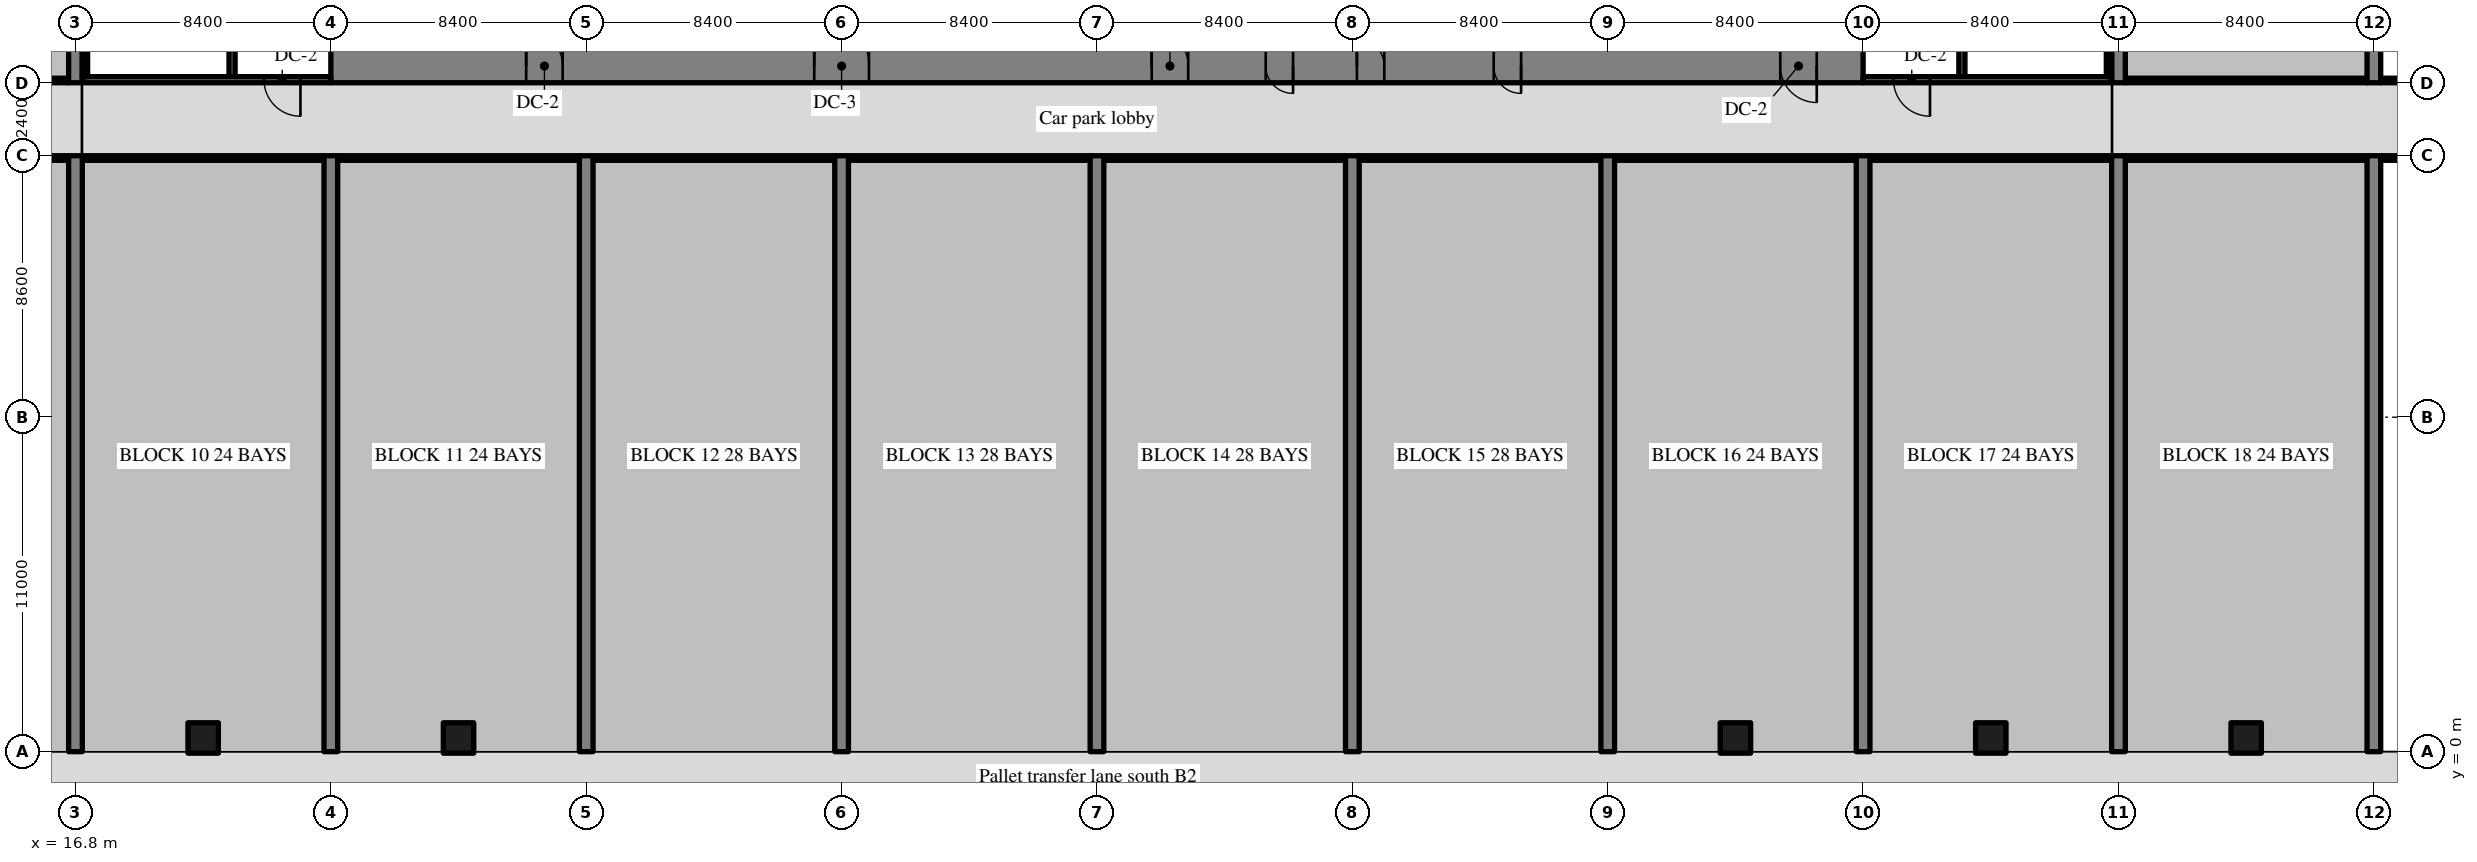
"""IFC4 building model, lengths in metres.
Left out: names, types, materials, properties, quantities, classifications, styles, units other than length and angle.
Written with IfcOpenShell. Run it as: python <this file> out.ifc"""

import sys

from ifc_helpers import new_model, si_unit, direction, frame, frame_2d, origin, origin_2d, place, context, subcontext, project, spatial, rectangle, extrude, source, transform, mapped, element, fill, save


model = new_model("IFC4")
c1 = context("Model", 3, precision=1e-05, world=origin(), true_north=direction((0.0, 1.0)))
c2 = subcontext(c1, "Body", "Model", "MODEL_VIEW")
j1 = project(units=[si_unit("LENGTHUNIT", "METRE"), si_unit("PLANEANGLEUNIT", "RADIAN")], contexts=[c1])
p1 = place(None, origin())
s1 = spatial("IfcSite", under=j1, at=p1, CompositionType="ELEMENT")
p2 = place(p1, origin())
s2 = spatial("IfcBuilding", under=s1, at=p2, CompositionType="ELEMENT")
p3 = place(p2, frame((0.0, 0.0, -9.0)))
s3 = spatial("IfcBuildingStorey", under=s2, at=p3, CompositionType="ELEMENT", Elevation=-9.0)
m1 = source(origin(), c2, "Body", "SweptSolid", [
    extrude(rectangle(XDim=50.4, YDim=1.1, at=frame_2d((25.2, 0.0))), origin(), (0.0, 0.0, 1.0), 4.22),
])
p4 = place(p3, frame((25.2, 22.55, 0.0), z_axis=(0.0, 0.0, 1.0), x_axis=(1.0, 0.0, 0.0)))
e1 = element("IfcWall", 1, at=p4, inside=s3, PredefinedType="SHEAR", context=c2, shape_type="MappedRepresentation", body=[
    mapped(m1, transform((0.0, 0.0, 0.0), scale=1.0)),
])
m2 = source(origin(), c2, "Body", "SweptSolid", [
    extrude(rectangle(XDim=1.8, YDim=2.1, at=frame_2d((0.9, 1.05))), frame((0.0, 0.56, 0.0), z_axis=(0.0, -1.0, 0.0), x_axis=(1.0, 0.0, 0.0)), (0.0, 0.0, 1.0), 1.12),
])
p5 = place(p4, frame((15.9, 0.0, 0.0)))
e2 = element("IfcOpeningElement", 2, at=p5, cuts=e1, PredefinedType="OPENING", context=c2, shape_type="MappedRepresentation", body=[
    mapped(m2, transform((0.0, 0.0, 0.0), scale=1.0)),
])
m3 = source(origin(), c2, "Body", "SweptSolid", [
    extrude(rectangle(XDim=1.2, YDim=2.1, at=frame_2d((0.6, 1.05))), frame((0.0, 0.56, 0.0), z_axis=(0.0, -1.0, 0.0), x_axis=(1.0, 0.0, 0.0)), (0.0, 0.0, 1.0), 1.12),
])
p6 = place(p4, frame((27.0, 0.0, 0.0)))
e3 = element("IfcOpeningElement", 3, at=p6, cuts=e1, PredefinedType="OPENING", context=c2, shape_type="MappedRepresentation", body=[
    mapped(m3, transform((0.0, 0.0, 0.0), scale=1.0)),
])
m4 = source(origin(), c2, "Body", "SweptSolid", [
    extrude(rectangle(XDim=0.9, YDim=2.1, at=frame_2d((0.45, 1.05))), frame((0.0, 0.56, 0.0), z_axis=(0.0, -1.0, 0.0), x_axis=(1.0, 0.0, 0.0)), (0.0, 0.0, 1.0), 1.12),
])
p7 = place(p4, frame((33.75, 0.0, 0.0)))
e4 = element("IfcOpeningElement", 4, at=p7, cuts=e1, PredefinedType="OPENING", context=c2, shape_type="MappedRepresentation", body=[
    mapped(m4, transform((0.0, 0.0, 0.0), scale=1.0)),
])
p8 = place(p4, frame((30.75, 0.0, 0.0)))
e5 = element("IfcOpeningElement", 5, at=p8, cuts=e1, PredefinedType="OPENING", context=c2, shape_type="MappedRepresentation", body=[
    mapped(m4, transform((0.0, 0.0, 0.0), scale=1.0)),
])
p9 = place(p4, frame((38.25, 0.0, 0.0)))
e6 = element("IfcOpeningElement", 6, at=p9, cuts=e1, PredefinedType="OPENING", context=c2, shape_type="MappedRepresentation", body=[
    mapped(m4, transform((0.0, 0.0, 0.0), scale=1.0)),
])
p10 = place(p4, frame((6.425, 0.0, 0.0)))
e7 = element("IfcOpeningElement", 7, at=p10, cuts=e1, PredefinedType="OPENING", context=c2, shape_type="MappedRepresentation", body=[
    mapped(m3, transform((0.0, 0.0, 0.0), scale=1.0)),
])
p11 = place(p4, frame((47.675, 0.0, 0.0)))
e8 = element("IfcOpeningElement", 8, at=p11, cuts=e1, PredefinedType="OPENING", context=c2, shape_type="MappedRepresentation", body=[
    mapped(m3, transform((0.0, 0.0, 0.0), scale=1.0)),
])
m5 = source(origin(), c2, "Body", "SweptSolid", [
    extrude(rectangle(XDim=19.6, YDim=0.45, at=frame_2d((9.8, 0.0))), origin(), (0.0, 0.0, 1.0), 4.22),
])
p12 = place(p3, frame((16.8, 0.0, 0.0), z_axis=(0.0, 0.0, 1.0), x_axis=(0.0, 1.0, 0.0)))
e9 = element("IfcWall", 9, at=p12, inside=s3, PredefinedType="SHEAR", context=c2, shape_type="MappedRepresentation", body=[
    mapped(m5, transform((0.0, 0.0, 0.0), scale=1.0)),
])
m6 = source(origin(), c2, "Body", "SweptSolid", [
    extrude(rectangle(XDim=20.0, YDim=0.45, at=frame_2d((10.0, 0.0))), origin(), (0.0, 0.0, 1.0), 4.22),
])
p13 = place(p3, frame((16.8, 22.0, 0.0), z_axis=(0.0, 0.0, 1.0), x_axis=(0.0, 1.0, 0.0)))
e10 = element("IfcWall", 10, at=p13, inside=s3, PredefinedType="SHEAR", context=c2, shape_type="MappedRepresentation", body=[
    mapped(m6, transform((0.0, 0.0, 0.0), scale=1.0)),
])
for number, where, z_axis, x_axis in (
    (11, (25.2, 0.0, 0.0), (0.0, 0.0, 1.0), (0.0, 1.0, 0.0)),
    (12, (33.6, 0.0, 0.0), (0.0, 0.0, 1.0), (0.0, 1.0, 0.0)),
    (13, (42.0, 0.0, 0.0), (0.0, 0.0, 1.0), (0.0, 1.0, 0.0)),
    (14, (50.4, 0.0, 0.0), (0.0, 0.0, 1.0), (0.0, 1.0, 0.0)),
    (15, (58.8, 0.0, 0.0), (0.0, 0.0, 1.0), (0.0, 1.0, 0.0)),
    (16, (67.2, 0.0, 0.0), (0.0, 0.0, 1.0), (0.0, 1.0, 0.0)),
    (17, (75.6, 0.0, 0.0), (0.0, 0.0, 1.0), (0.0, 1.0, 0.0)),
    (18, (84.0, 0.0, 0.0), (0.0, 0.0, 1.0), (0.0, 1.0, 0.0)),
):
    element("IfcWall", number, at=place(p3, frame(where, z_axis=z_axis, x_axis=x_axis)), inside=s3, PredefinedType="SHEAR", context=c2, shape_type="MappedRepresentation", body=[
        mapped(m5, transform((0.0, 0.0, 0.0), scale=1.0)),
    ])
p14 = place(p3, frame((84.0, 22.0, 0.0), z_axis=(0.0, 0.0, 1.0), x_axis=(0.0, 1.0, 0.0)))
e19 = element("IfcWall", 19, at=p14, inside=s3, PredefinedType="SHEAR", context=c2, shape_type="MappedRepresentation", body=[
    mapped(m6, transform((0.0, 0.0, 0.0), scale=1.0)),
])
p15 = place(p3, frame((92.4, 0.0, 0.0), z_axis=(0.0, 0.0, 1.0), x_axis=(0.0, 1.0, 0.0)))
e20 = element("IfcWall", 20, at=p15, inside=s3, PredefinedType="SHEAR", context=c2, shape_type="MappedRepresentation", body=[
    mapped(m5, transform((0.0, 0.0, 0.0), scale=1.0)),
])
p16 = place(p3, frame((92.4, 22.0, 0.0), z_axis=(0.0, 0.0, 1.0), x_axis=(0.0, 1.0, 0.0)))
e21 = element("IfcWall", 21, at=p16, inside=s3, PredefinedType="SHEAR", context=c2, shape_type="MappedRepresentation", body=[
    mapped(m6, transform((0.0, 0.0, 0.0), scale=1.0)),
])
m7 = source(origin(), c2, "Body", "SweptSolid", [
    extrude(rectangle(XDim=1.0, YDim=1.0, at=origin_2d()), origin(), (0.0, 0.0, 1.0), 4.22),
])
for number, where, z_axis, x_axis in (
    (22, (21.0, 0.45, 0.0), (0.0, 0.0, 1.0), (1.0, 0.0, 0.0)),
    (23, (29.4, 0.45, 0.0), (0.0, 0.0, 1.0), (1.0, 0.0, 0.0)),
    (24, (71.4, 0.45, 0.0), (0.0, 0.0, 1.0), (1.0, 0.0, 0.0)),
    (25, (79.8, 0.45, 0.0), (0.0, 0.0, 1.0), (1.0, 0.0, 0.0)),
    (26, (88.2, 0.45, 0.0), (0.0, 0.0, 1.0), (1.0, 0.0, 0.0)),
):
    element("IfcColumn", number, at=place(p3, frame(where, z_axis=z_axis, x_axis=x_axis)), inside=s3, PredefinedType="COLUMN", context=c2, shape_type="MappedRepresentation", body=[
        mapped(m7, transform((0.0, 0.0, 0.0), scale=1.0)),
    ])
m8 = source(origin(), c2, "Body", "SweptSolid", [
    extrude(rectangle(XDim=8.3, YDim=0.2, at=frame_2d((4.15, 0.0))), origin(), (0.0, 0.0, 1.0), 4.22),
])
p17 = place(p3, frame((21.95, 22.1, 0.0), z_axis=(0.0, 0.0, 1.0), x_axis=(0.0, 1.0, 0.0)))
e27 = element("IfcWall", 27, at=p17, inside=s3, PredefinedType="SOLIDWALL", context=c2, shape_type="MappedRepresentation", body=[
    mapped(m8, transform((0.0, 0.0, 0.0), scale=1.0)),
])
m9 = source(origin(), c2, "Body", "SweptSolid", [
    extrude(rectangle(XDim=1.2, YDim=2.1, at=frame_2d((0.6, 1.05))), frame((0.0, 0.11, 0.0), z_axis=(0.0, -1.0, 0.0), x_axis=(1.0, 0.0, 0.0)), (0.0, 0.0, 1.0), 0.22),
])
p18 = place(p17, frame((6.5, 0.0, 0.0)))
e28 = element("IfcOpeningElement", 28, at=p18, cuts=e27, PredefinedType="OPENING", context=c2, shape_type="MappedRepresentation", body=[
    mapped(m9, transform((0.0, 0.0, 0.0), scale=1.0)),
])
m10 = source(origin(), c2, "Body", "SweptSolid", [
    extrude(rectangle(XDim=8.175, YDim=0.2, at=frame_2d((4.087, 0.0))), origin(), (0.0, 0.0, 1.0), 4.22),
])
p19 = place(p3, frame((17.025, 22.1, 0.0), z_axis=(0.0, 0.0, 1.0), x_axis=(1.0, 0.0, 0.0)))
e29 = element("IfcWall", 29, at=p19, inside=s3, PredefinedType="SOLIDWALL", context=c2, shape_type="MappedRepresentation", body=[
    mapped(m10, transform((0.0, 0.0, 0.0), scale=1.0)),
])
p20 = place(p19, frame((5.975, 0.0, 0.0)))
e30 = element("IfcOpeningElement", 30, at=p20, cuts=e29, PredefinedType="OPENING", context=c2, shape_type="MappedRepresentation", body=[
    mapped(m9, transform((0.0, 0.0, 0.0), scale=1.0)),
])
p21 = place(p3, frame((78.85, 22.1, 0.0), z_axis=(0.0, 0.0, 1.0), x_axis=(0.0, 1.0, 0.0)))
e31 = element("IfcWall", 31, at=p21, inside=s3, PredefinedType="SOLIDWALL", context=c2, shape_type="MappedRepresentation", body=[
    mapped(m8, transform((0.0, 0.0, 0.0), scale=1.0)),
])
p22 = place(p21, frame((6.5, 0.0, 0.0)))
e32 = element("IfcOpeningElement", 32, at=p22, cuts=e31, PredefinedType="OPENING", context=c2, shape_type="MappedRepresentation", body=[
    mapped(m9, transform((0.0, 0.0, 0.0), scale=1.0)),
])
m11 = source(origin(), c2, "Body", "SweptSolid", [
    extrude(rectangle(XDim=8.175, YDim=0.2, at=frame_2d((4.087, 0.0))), origin(), (0.0, 0.0, 1.0), 4.22),
])
p23 = place(p3, frame((83.775, 22.1, 0.0), z_axis=(0.0, 0.0, 1.0), x_axis=(-1.0, 0.0, 0.0)))
e33 = element("IfcWall", 33, at=p23, inside=s3, PredefinedType="SOLIDWALL", context=c2, shape_type="MappedRepresentation", body=[
    mapped(m11, transform((0.0, 0.0, 0.0), scale=1.0)),
])
p24 = place(p23, frame((5.975, 0.0, 0.0)))
e34 = element("IfcOpeningElement", 34, at=p24, cuts=e33, PredefinedType="OPENING", context=c2, shape_type="MappedRepresentation", body=[
    mapped(m9, transform((0.0, 0.0, 0.0), scale=1.0)),
])
m12 = source(origin(), c2, "Body", "SweptSolid", [
    extrude(rectangle(XDim=8.1, YDim=0.175, at=frame_2d((4.05, 0.0))), origin(), (0.0, 0.0, 1.0), 4.22),
])
for number, where, z_axis, x_axis in (
    (35, (17.112, 22.2, 0.0), (0.0, 0.0, 1.0), (0.0, 1.0, 0.0)),
    (36, (83.688, 22.2, 0.0), (0.0, 0.0, 1.0), (0.0, 1.0, 0.0)),
):
    element("IfcWall", number, at=place(p3, frame(where, z_axis=z_axis, x_axis=x_axis)), inside=s3, PredefinedType="SOLIDWALL", context=c2, shape_type="MappedRepresentation", body=[
        mapped(m12, transform((0.0, 0.0, 0.0), scale=1.0)),
    ])
m13 = source(origin(), c2, "Body", "SweptSolid", [
    extrude(rectangle(XDim=7.95, YDim=0.15, at=frame_2d((3.975, 0.0))), origin(), (0.0, 0.0, 1.0), 4.22),
])
for number, where, z_axis, x_axis in (
    (37, (8.625, 19.525, 0.0), (0.0, 0.0, 1.0), (1.0, 0.0, 0.0)),
    (38, (8.625, 22.075, 0.0), (0.0, 0.0, 1.0), (1.0, 0.0, 0.0)),
):
    element("IfcWall", number, at=place(p3, frame(where, z_axis=z_axis, x_axis=x_axis)), inside=s3, PredefinedType="PARTITIONING", context=c2, shape_type="MappedRepresentation", body=[
        mapped(m13, transform((0.0, 0.0, 0.0), scale=1.0)),
    ])
m14 = source(origin(), c2, "Body", "SweptSolid", [
    extrude(rectangle(XDim=7.95, YDim=0.15, at=frame_2d((3.975, 0.0))), origin(), (0.0, 0.0, 1.0), 4.22),
])
p25 = place(p3, frame((17.025, 19.525, 0.0), z_axis=(0.0, 0.0, 1.0), x_axis=(1.0, 0.0, 0.0)))
e39 = element("IfcWall", 39, at=p25, inside=s3, PredefinedType="PARTITIONING", context=c2, shape_type="MappedRepresentation", body=[
    mapped(m14, transform((0.0, 0.0, 0.0), scale=1.0)),
])
for number, where, z_axis, x_axis in (
    (40, (25.425, 19.525, 0.0), (0.0, 0.0, 1.0), (1.0, 0.0, 0.0)),
    (41, (33.825, 19.525, 0.0), (0.0, 0.0, 1.0), (1.0, 0.0, 0.0)),
    (42, (42.225, 19.525, 0.0), (0.0, 0.0, 1.0), (1.0, 0.0, 0.0)),
    (43, (50.625, 19.525, 0.0), (0.0, 0.0, 1.0), (1.0, 0.0, 0.0)),
):
    element("IfcWall", number, at=place(p3, frame(where, z_axis=z_axis, x_axis=x_axis)), inside=s3, PredefinedType="PARTITIONING", context=c2, shape_type="MappedRepresentation", body=[
        mapped(m13, transform((0.0, 0.0, 0.0), scale=1.0)),
    ])
p26 = place(p3, frame((59.025, 19.525, 0.0), z_axis=(0.0, 0.0, 1.0), x_axis=(1.0, 0.0, 0.0)))
e44 = element("IfcWall", 44, at=p26, inside=s3, PredefinedType="PARTITIONING", context=c2, shape_type="MappedRepresentation", body=[
    mapped(m14, transform((0.0, 0.0, 0.0), scale=1.0)),
])
for number, where, z_axis, x_axis in (
    (45, (67.425, 19.525, 0.0), (0.0, 0.0, 1.0), (1.0, 0.0, 0.0)),
    (46, (75.825, 19.525, 0.0), (0.0, 0.0, 1.0), (1.0, 0.0, 0.0)),
    (47, (84.225, 19.525, 0.0), (0.0, 0.0, 1.0), (1.0, 0.0, 0.0)),
    (48, (84.225, 22.075, 0.0), (0.0, 0.0, 1.0), (1.0, 0.0, 0.0)),
):
    element("IfcWall", number, at=place(p3, frame(where, z_axis=z_axis, x_axis=x_axis)), inside=s3, PredefinedType="PARTITIONING", context=c2, shape_type="MappedRepresentation", body=[
        mapped(m13, transform((0.0, 0.0, 0.0), scale=1.0)),
    ])
m15 = source(origin(), c2, "Body", "SweptSolid", [
    extrude(rectangle(XDim=7.725, YDim=0.15, at=frame_2d((3.863, 0.0))), origin(), (0.0, 0.0, 1.0), 4.22),
])
for number, where, z_axis, x_axis in (
    (49, (92.625, 19.525, 0.0), (0.0, 0.0, 1.0), (1.0, 0.0, 0.0)),
    (50, (92.625, 22.075, 0.0), (0.0, 0.0, 1.0), (1.0, 0.0, 0.0)),
):
    element("IfcWall", number, at=place(p3, frame(where, z_axis=z_axis, x_axis=x_axis)), inside=s3, PredefinedType="PARTITIONING", context=c2, shape_type="MappedRepresentation", body=[
        mapped(m15, transform((0.0, 0.0, 0.0), scale=1.0)),
    ])
m16 = source(origin(), c2, "Body", "SweptSolid", [
    extrude(rectangle(XDim=1.8, YDim=2.1, at=frame_2d((0.9, 1.05))), frame((0.0, 0.325, 0.0), z_axis=(0.0, -1.0, 0.0), x_axis=(1.0, 0.0, 0.0)), (0.0, 0.0, 1.0), 0.05),
])
p27 = place(p5, origin())
e51 = element("IfcDoor", 51, at=p27, inside=s3, OperationType="DOUBLE_DOOR_SINGLE_SWING", PredefinedType="DOOR", context=c2, shape_type="MappedRepresentation", body=[
    mapped(m16, transform((0.0, 0.0, 0.0), scale=1.0)),
])
fill(e2, e51)
m17 = source(origin(), c2, "Body", "SweptSolid", [
    extrude(rectangle(XDim=1.2, YDim=2.1, at=frame_2d((0.6, 1.05))), frame((0.0, 0.325, 0.0), z_axis=(0.0, -1.0, 0.0), x_axis=(1.0, 0.0, 0.0)), (0.0, 0.0, 1.0), 0.05),
])
p28 = place(p6, origin())
e52 = element("IfcDoor", 52, at=p28, inside=s3, OperationType="SINGLE_SWING_LEFT", PredefinedType="DOOR", context=c2, shape_type="MappedRepresentation", body=[
    mapped(m17, transform((0.0, 0.0, 0.0), scale=1.0)),
])
fill(e3, e52)
m18 = source(origin(), c2, "Body", "SweptSolid", [
    extrude(rectangle(XDim=0.9, YDim=2.1, at=frame_2d((0.45, 1.05))), frame((0.0, 0.325, 0.0), z_axis=(0.0, -1.0, 0.0), x_axis=(1.0, 0.0, 0.0)), (0.0, 0.0, 1.0), 0.05),
])
p29 = place(p7, origin())
e53 = element("IfcDoor", 53, at=p29, inside=s3, OperationType="SINGLE_SWING_LEFT", PredefinedType="DOOR", context=c2, shape_type="MappedRepresentation", body=[
    mapped(m18, transform((0.0, 0.0, 0.0), scale=1.0)),
])
fill(e4, e53)
p30 = place(p8, origin())
e54 = element("IfcDoor", 54, at=p30, inside=s3, OperationType="SINGLE_SWING_RIGHT", PredefinedType="DOOR", context=c2, shape_type="MappedRepresentation", body=[
    mapped(m18, transform((0.0, 0.0, 0.0), scale=1.0)),
])
fill(e5, e54)
p31 = place(p9, origin())
e55 = element("IfcDoor", 55, at=p31, inside=s3, OperationType="SINGLE_SWING_RIGHT", PredefinedType="DOOR", context=c2, shape_type="MappedRepresentation", body=[
    mapped(m18, transform((0.0, 0.0, 0.0), scale=1.0)),
])
fill(e6, e55)
p32 = place(p10, origin())
e56 = element("IfcDoor", 56, at=p32, inside=s3, OperationType="SINGLE_SWING_LEFT", PredefinedType="DOOR", context=c2, shape_type="MappedRepresentation", body=[
    mapped(m17, transform((0.0, 0.0, 0.0), scale=1.0)),
])
fill(e7, e56)
p33 = place(p11, origin())
e57 = element("IfcDoor", 57, at=p33, inside=s3, OperationType="SINGLE_SWING_RIGHT", PredefinedType="DOOR", context=c2, shape_type="MappedRepresentation", body=[
    mapped(m17, transform((0.0, 0.0, 0.0), scale=1.0)),
])
fill(e8, e57)
m19 = source(origin(), c2, "Body", "SweptSolid", [
    extrude(rectangle(XDim=1.2, YDim=2.1, at=frame_2d((0.6, 1.05))), frame((0.0, 0.025, 0.0), z_axis=(0.0, -1.0, 0.0), x_axis=(1.0, 0.0, 0.0)), (0.0, 0.0, 1.0), 0.05),
])
p34 = place(p20, origin())
e58 = element("IfcDoor", 58, at=p34, inside=s3, OperationType="SINGLE_SWING_RIGHT", PredefinedType="DOOR", context=c2, shape_type="MappedRepresentation", body=[
    mapped(m19, transform((0.0, 0.0, 0.0), scale=1.0)),
])
fill(e30, e58)
p35 = place(p24, origin())
e59 = element("IfcDoor", 59, at=p35, inside=s3, OperationType="SINGLE_SWING_LEFT", PredefinedType="DOOR", context=c2, shape_type="MappedRepresentation", body=[
    mapped(m19, transform((0.0, 0.0, 0.0), scale=1.0)),
])
fill(e34, e59)
save(model, sys.argv[1])
